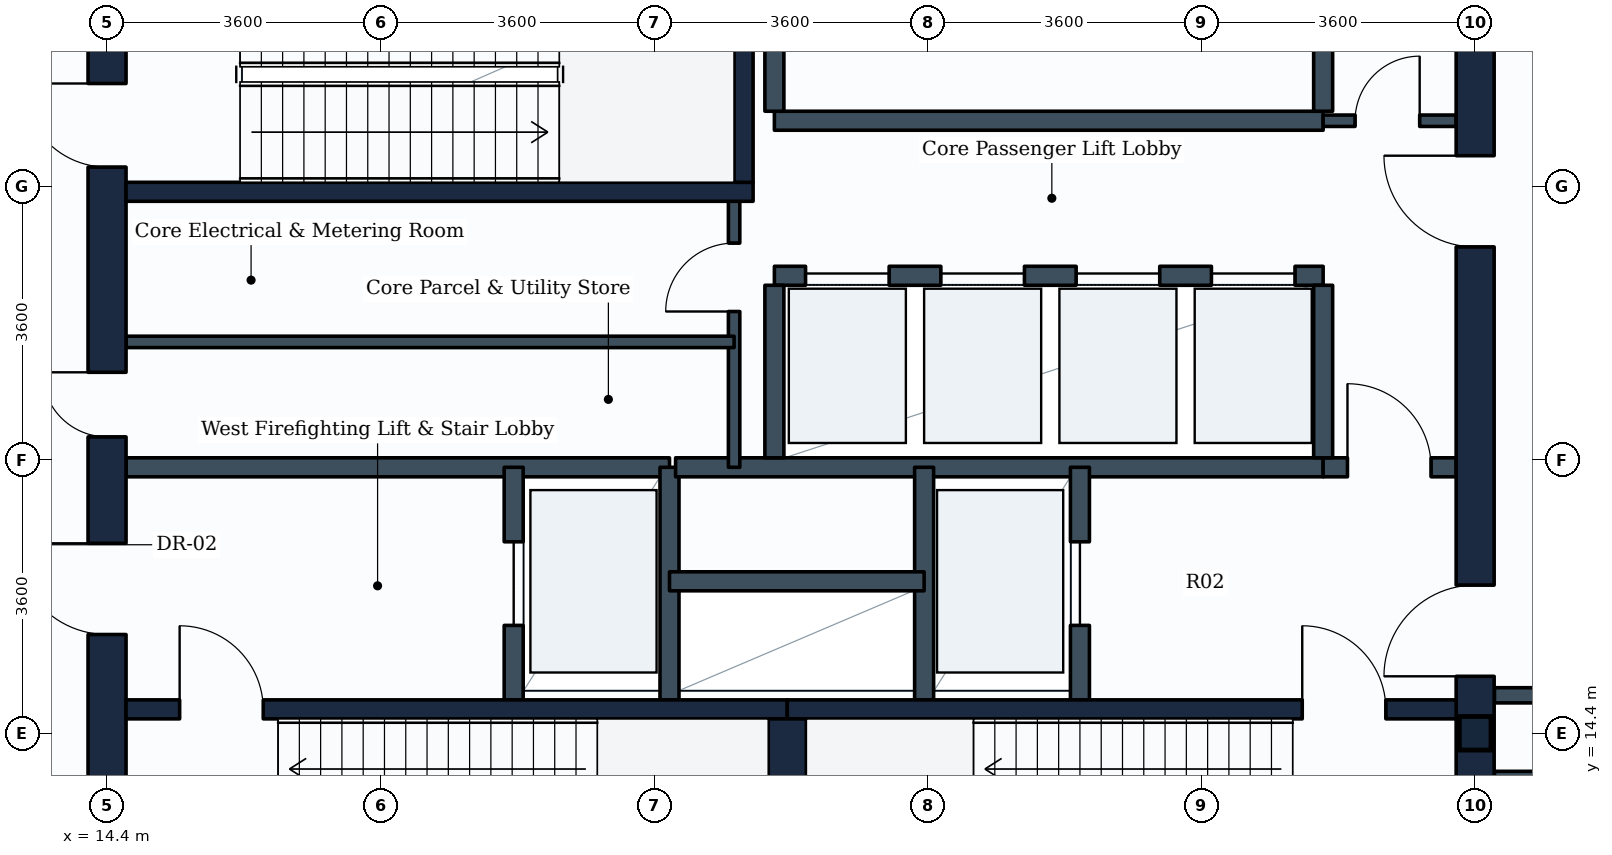
"""IFC4 building model, lengths in metres.
Left out: names, types, materials, properties, quantities, classifications, styles, units other than length and angle.
Written with IfcOpenShell. Run it as: python <this file> out.ifc"""

import sys

from ifc_helpers import new_model, si_unit, direction, frame, frame_2d, origin, origin_2d, place, context, subcontext, project, spatial, rectangle, i_section, extrude, element, fill, save


model = new_model("IFC4")
c1 = context("Model", 3, precision=1e-05, world=origin(), true_north=direction((0.0, 1.0)))
c2 = subcontext(c1, "Body", "Model", "MODEL_VIEW")
j1 = project(units=[si_unit("LENGTHUNIT", "METRE"), si_unit("PLANEANGLEUNIT", "RADIAN")], contexts=[c1])
p1 = place(None, origin())
s1 = spatial("IfcSite", under=j1, at=p1, CompositionType="ELEMENT")
p2 = place(p1, origin())
s2 = spatial("IfcBuilding", under=s1, at=p2, CompositionType="ELEMENT")
p3 = place(p2, frame((0.0, 0.0, 169.4)))
s3 = spatial("IfcBuildingStorey", under=s2, at=p3, CompositionType="ELEMENT", Elevation=169.4)
p4 = place(p3, frame((32.4, 14.4, 0.0), z_axis=(0.0, 0.0, 1.0), x_axis=(1.0, 0.0, 0.0)))
e1 = element("IfcColumn", 1, at=p4, inside=s3, PredefinedType="COLUMN", context=c2, shape_type="SweptSolid", body=[
    extrude(i_section(OverallWidth=0.416, OverallDepth=0.442, WebThickness=0.025, FlangeThickness=0.041, FilletRadius=0.015, at=origin_2d()), origin(), (0.0, 0.0, 1.0), 5.4),
])
p5 = place(p3, frame((14.4, 10.8, 0.0), z_axis=(0.0, 0.0, 1.0), x_axis=(0.0, 1.0, 0.0)))
e2 = element("IfcWall", 2, at=p5, inside=s3, PredefinedType="SHEAR", context=c2, shape_type="SweptSolid", body=[
    extrude(rectangle(XDim=14.4, YDim=0.5, at=frame_2d((7.2, 0.0))), origin(), (0.0, 0.0, 1.0), 5.08),
])
p6 = place(p5, frame((11.05, 0.0, 0.0)))
e3 = element("IfcOpeningElement", 3, at=p6, cuts=e2, PredefinedType="OPENING", context=c2, shape_type="SweptSolid", body=[
    extrude(rectangle(XDim=1.1, YDim=2.1, at=frame_2d((0.55, 1.05))), frame((0.0, 0.26, 0.0), z_axis=(0.0, -1.0, 0.0), x_axis=(1.0, 0.0, 0.0)), (0.0, 0.0, 1.0), 0.52),
])
p7 = place(p5, frame((4.9, 0.0, 0.0)))
e4 = element("IfcOpeningElement", 4, at=p7, cuts=e2, PredefinedType="OPENING", context=c2, shape_type="SweptSolid", body=[
    extrude(rectangle(XDim=1.2, YDim=2.1, at=frame_2d((0.6, 1.05))), frame((0.0, 0.26, 0.0), z_axis=(0.0, -1.0, 0.0), x_axis=(1.0, 0.0, 0.0)), (0.0, 0.0, 1.0), 0.52),
])
p8 = place(p5, frame((7.5, 0.0, 0.0)))
e5 = element("IfcOpeningElement", 5, at=p8, cuts=e2, PredefinedType="OPENING", context=c2, shape_type="SweptSolid", body=[
    extrude(rectangle(XDim=0.85, YDim=2.1, at=frame_2d((0.425, 1.05))), frame((0.0, 0.26, 0.0), z_axis=(0.0, -1.0, 0.0), x_axis=(1.0, 0.0, 0.0)), (0.0, 0.0, 1.0), 0.52),
])
p9 = place(p3, frame((32.4, 10.8, 0.0), z_axis=(0.0, 0.0, 1.0), x_axis=(0.0, 1.0, 0.0)))
e6 = element("IfcWall", 6, at=p9, inside=s3, PredefinedType="SHEAR", context=c2, shape_type="SweptSolid", body=[
    extrude(rectangle(XDim=14.4, YDim=0.5, at=frame_2d((7.2, 0.0))), origin(), (0.0, 0.0, 1.0), 5.08),
])
p10 = place(p9, frame((4.35, 0.0, 0.0)))
e7 = element("IfcOpeningElement", 7, at=p10, cuts=e6, PredefinedType="OPENING", context=c2, shape_type="SweptSolid", body=[
    extrude(rectangle(XDim=1.2, YDim=2.1, at=frame_2d((0.6, 1.05))), frame((0.0, 0.26, 0.0), z_axis=(0.0, -1.0, 0.0), x_axis=(1.0, 0.0, 0.0)), (0.0, 0.0, 1.0), 0.52),
])
p11 = place(p9, frame((10.0, 0.0, 0.0)))
e8 = element("IfcOpeningElement", 8, at=p11, cuts=e6, PredefinedType="OPENING", context=c2, shape_type="SweptSolid", body=[
    extrude(rectangle(XDim=1.2, YDim=2.1, at=frame_2d((0.6, 1.05))), frame((0.0, 0.26, 0.0), z_axis=(0.0, -1.0, 0.0), x_axis=(1.0, 0.0, 0.0)), (0.0, 0.0, 1.0), 0.52),
])
p12 = place(p3, frame((14.65, 14.715, 0.0), z_axis=(0.0, 0.0, 1.0), x_axis=(1.0, 0.0, 0.0)))
e9 = element("IfcWall", 9, at=p12, inside=s3, PredefinedType="SHEAR", context=c2, shape_type="SweptSolid", body=[
    extrude(rectangle(XDim=8.7, YDim=0.25, at=frame_2d((4.35, 0.0))), origin(), (0.0, 0.0, 1.0), 5.08),
])
p13 = place(p12, frame((0.705, 0.0, 0.0)))
e10 = element("IfcOpeningElement", 10, at=p13, cuts=e9, PredefinedType="OPENING", context=c2, shape_type="SweptSolid", body=[
    extrude(rectangle(XDim=1.1, YDim=2.1, at=frame_2d((0.55, 1.05))), frame((0.0, 0.135, 0.0), z_axis=(0.0, -1.0, 0.0), x_axis=(1.0, 0.0, 0.0)), (0.0, 0.0, 1.0), 0.27),
])
p14 = place(p3, frame((23.35, 14.715, 0.0), z_axis=(0.0, 0.0, 1.0), x_axis=(1.0, 0.0, 0.0)))
e11 = element("IfcWall", 11, at=p14, inside=s3, PredefinedType="SHEAR", context=c2, shape_type="SweptSolid", body=[
    extrude(rectangle(XDim=8.8, YDim=0.25, at=frame_2d((4.4, 0.0))), origin(), (0.0, 0.0, 1.0), 5.08),
])
p15 = place(p14, frame((6.775, 0.0, 0.0)))
e12 = element("IfcOpeningElement", 12, at=p15, cuts=e11, PredefinedType="OPENING", context=c2, shape_type="SweptSolid", body=[
    extrude(rectangle(XDim=1.1, YDim=2.1, at=frame_2d((0.55, 1.05))), frame((0.0, 0.135, 0.0), z_axis=(0.0, -1.0, 0.0), x_axis=(1.0, 0.0, 0.0)), (0.0, 0.0, 1.0), 0.27),
])
p16 = place(p3, frame((23.35, 11.75, 0.0), z_axis=(0.0, 0.0, 1.0), x_axis=(0.0, 1.0, 0.0)))
e13 = element("IfcWall", 13, at=p16, inside=s3, PredefinedType="SHEAR", context=c2, shape_type="SweptSolid", body=[
    extrude(rectangle(XDim=2.84, YDim=0.5, at=frame_2d((1.42, 0.0))), origin(), (0.0, 0.0, 1.0), 5.08),
])
p17 = place(p3, frame((14.65, 21.525, 0.0), z_axis=(0.0, 0.0, 1.0), x_axis=(1.0, 0.0, 0.0)))
e14 = element("IfcWall", 14, at=p17, inside=s3, PredefinedType="SHEAR", context=c2, shape_type="SweptSolid", body=[
    extrude(rectangle(XDim=8.25, YDim=0.25, at=frame_2d((4.125, 0.0))), origin(), (0.0, 0.0, 1.0), 5.08),
])
p18 = place(p3, frame((22.775, 21.65, 0.0), z_axis=(0.0, 0.0, 1.0), x_axis=(0.0, 1.0, 0.0)))
e15 = element("IfcWall", 15, at=p18, inside=s3, PredefinedType="SHEAR", context=c2, shape_type="SweptSolid", body=[
    extrude(rectangle(XDim=2.84, YDim=0.25, at=frame_2d((1.42, 0.0))), origin(), (0.0, 0.0, 1.0), 5.08),
])
p19 = place(p3, frame((14.65, 17.9, 0.0), z_axis=(0.0, 0.0, 1.0), x_axis=(1.0, 0.0, 0.0)))
e16 = element("IfcWall", 16, at=p19, inside=s3, PredefinedType="PARTITIONING", context=c2, shape_type="SweptSolid", body=[
    extrude(rectangle(XDim=7.15, YDim=0.25, at=frame_2d((3.575, 0.0))), origin(), (0.0, 0.0, 1.0), 5.065),
])
p20 = place(p3, frame((19.75, 14.84, 0.0), z_axis=(0.0, 0.0, 1.0), x_axis=(0.0, 1.0, 0.0)))
e17 = element("IfcWall", 17, at=p20, inside=s3, PredefinedType="PARTITIONING", context=c2, shape_type="SweptSolid", body=[
    extrude(rectangle(XDim=3.06, YDim=0.25, at=frame_2d((1.53, 0.0))), origin(), (0.0, 0.0, 1.0), 5.065),
])
p21 = place(p20, frame((0.98, 0.0, 0.0)))
e18 = element("IfcOpeningElement", 18, at=p21, cuts=e17, PredefinedType="OPENING", context=c2, shape_type="SweptSolid", body=[
    extrude(rectangle(XDim=1.1, YDim=2.1, at=frame_2d((0.55, 1.05))), frame((0.0, 0.135, 0.0), z_axis=(0.0, -1.0, 0.0), x_axis=(1.0, 0.0, 0.0)), (0.0, 0.0, 1.0), 0.27),
])
p22 = place(p3, frame((21.8, 14.84, 0.0), z_axis=(0.0, 0.0, 1.0), x_axis=(0.0, 1.0, 0.0)))
e19 = element("IfcWall", 19, at=p22, inside=s3, PredefinedType="PARTITIONING", context=c2, shape_type="SweptSolid", body=[
    extrude(rectangle(XDim=3.06, YDim=0.25, at=frame_2d((1.53, 0.0))), origin(), (0.0, 0.0, 1.0), 5.065),
])
p23 = place(p3, frame((21.88, 17.9, 0.0), z_axis=(0.0, 0.0, 1.0), x_axis=(1.0, 0.0, 0.0)))
e20 = element("IfcWall", 20, at=p23, inside=s3, PredefinedType="PARTITIONING", context=c2, shape_type="SweptSolid", body=[
    extrude(rectangle(XDim=8.52, YDim=0.25, at=frame_2d((4.26, 0.0))), origin(), (0.0, 0.0, 1.0), 5.065),
])
p24 = place(p3, frame((30.4, 17.9, 0.0), z_axis=(0.0, 0.0, 1.0), x_axis=(1.0, 0.0, 0.0)))
e21 = element("IfcWall", 21, at=p24, inside=s3, PredefinedType="PARTITIONING", context=c2, shape_type="SweptSolid", body=[
    extrude(rectangle(XDim=1.75, YDim=0.25, at=frame_2d((0.875, 0.0))), origin(), (0.0, 0.0, 1.0), 5.065),
])
p25 = place(p24, frame((0.32, 0.0, 0.0)))
e22 = element("IfcOpeningElement", 22, at=p25, cuts=e21, PredefinedType="OPENING", context=c2, shape_type="SweptSolid", body=[
    extrude(rectangle(XDim=1.1, YDim=2.1, at=frame_2d((0.55, 1.05))), frame((0.0, 0.135, 0.0), z_axis=(0.0, -1.0, 0.0), x_axis=(1.0, 0.0, 0.0)), (0.0, 0.0, 1.0), 0.27),
])
p26 = place(p3, frame((25.15, 14.84, 0.0), z_axis=(0.0, 0.0, 1.0), x_axis=(0.0, 1.0, 0.0)))
e23 = element("IfcWall", 23, at=p26, inside=s3, PredefinedType="PARTITIONING", context=c2, shape_type="SweptSolid", body=[
    extrude(rectangle(XDim=3.06, YDim=0.25, at=frame_2d((1.53, 0.0))), origin(), (0.0, 0.0, 1.0), 5.065),
])
p27 = place(p3, frame((27.2, 14.84, 0.0), z_axis=(0.0, 0.0, 1.0), x_axis=(0.0, 1.0, 0.0)))
e24 = element("IfcWall", 24, at=p27, inside=s3, PredefinedType="PARTITIONING", context=c2, shape_type="SweptSolid", body=[
    extrude(rectangle(XDim=3.06, YDim=0.25, at=frame_2d((1.53, 0.0))), origin(), (0.0, 0.0, 1.0), 5.065),
])
p28 = place(p27, frame((0.98, 0.0, 0.0)))
e25 = element("IfcOpeningElement", 25, at=p28, cuts=e24, PredefinedType="OPENING", context=c2, shape_type="SweptSolid", body=[
    extrude(rectangle(XDim=1.1, YDim=2.1, at=frame_2d((0.55, 1.05))), frame((0.0, 0.135, 0.0), z_axis=(0.0, -1.0, 0.0), x_axis=(1.0, 0.0, 0.0)), (0.0, 0.0, 1.0), 0.27),
])
p29 = place(p3, frame((21.8, 16.4, 0.0), z_axis=(0.0, 0.0, 1.0), x_axis=(1.0, 0.0, 0.0)))
e26 = element("IfcWall", 26, at=p29, inside=s3, PredefinedType="PARTITIONING", context=c2, shape_type="SweptSolid", body=[
    extrude(rectangle(XDim=3.35, YDim=0.25, at=frame_2d((1.675, 0.0))), origin(), (0.0, 0.0, 1.0), 5.065),
])
p30 = place(p3, frame((23.18, 20.42, 0.0), z_axis=(0.0, 0.0, 1.0), x_axis=(1.0, 0.0, 0.0)))
e27 = element("IfcWall", 27, at=p30, inside=s3, PredefinedType="PARTITIONING", context=c2, shape_type="SweptSolid", body=[
    extrude(rectangle(XDim=7.22, YDim=0.25, at=frame_2d((3.61, 0.0))), origin(), (0.0, 0.0, 1.0), 5.065),
])
p31 = place(p30, frame((0.41, 0.0, 0.0)))
e28 = element("IfcOpeningElement", 28, at=p31, cuts=e27, PredefinedType="OPENING", context=c2, shape_type="SweptSolid", body=[
    extrude(rectangle(XDim=1.1, YDim=2.1, at=frame_2d((0.55, 1.05))), frame((0.0, 0.135, 0.0), z_axis=(0.0, -1.0, 0.0), x_axis=(1.0, 0.0, 0.0)), (0.0, 0.0, 1.0), 0.27),
])
p32 = place(p30, frame((2.19, 0.0, 0.0)))
e29 = element("IfcOpeningElement", 29, at=p32, cuts=e27, PredefinedType="OPENING", context=c2, shape_type="SweptSolid", body=[
    extrude(rectangle(XDim=1.1, YDim=2.1, at=frame_2d((0.55, 1.05))), frame((0.0, 0.135, 0.0), z_axis=(0.0, -1.0, 0.0), x_axis=(1.0, 0.0, 0.0)), (0.0, 0.0, 1.0), 0.27),
])
p33 = place(p30, frame((3.97, 0.0, 0.0)))
e30 = element("IfcOpeningElement", 30, at=p33, cuts=e27, PredefinedType="OPENING", context=c2, shape_type="SweptSolid", body=[
    extrude(rectangle(XDim=1.1, YDim=2.1, at=frame_2d((0.55, 1.05))), frame((0.0, 0.135, 0.0), z_axis=(0.0, -1.0, 0.0), x_axis=(1.0, 0.0, 0.0)), (0.0, 0.0, 1.0), 0.27),
])
p34 = place(p30, frame((5.75, 0.0, 0.0)))
e31 = element("IfcOpeningElement", 31, at=p34, cuts=e27, PredefinedType="OPENING", context=c2, shape_type="SweptSolid", body=[
    extrude(rectangle(XDim=1.1, YDim=2.1, at=frame_2d((0.55, 1.05))), frame((0.0, 0.135, 0.0), z_axis=(0.0, -1.0, 0.0), x_axis=(1.0, 0.0, 0.0)), (0.0, 0.0, 1.0), 0.27),
])
for number, where, z_axis, x_axis in (
    (32, (23.18, 18.025, 0.0), (0.0, 0.0, 1.0), (0.0, 1.0, 0.0)),
    (33, (30.4, 18.025, 0.0), (0.0, 0.0, 1.0), (0.0, 1.0, 0.0)),
):
    element("IfcWall", number, at=place(p3, frame(where, z_axis=z_axis, x_axis=x_axis)), inside=s3, PredefinedType="PARTITIONING", context=c2, shape_type="SweptSolid", body=[
        extrude(rectangle(XDim=2.27, YDim=0.25, at=frame_2d((1.135, 0.0))), origin(), (0.0, 0.0, 1.0), 5.065),
    ])
p35 = place(p3, frame((23.18, 22.46, 0.0), z_axis=(0.0, 0.0, 1.0), x_axis=(1.0, 0.0, 0.0)))
e34 = element("IfcWall", 34, at=p35, inside=s3, PredefinedType="PARTITIONING", context=c2, shape_type="SweptSolid", body=[
    extrude(rectangle(XDim=7.22, YDim=0.25, at=frame_2d((3.61, 0.0))), origin(), (0.0, 0.0, 1.0), 5.065),
])
for number, where, z_axis, x_axis in (
    (35, (23.18, 22.585, 0.0), (0.0, 0.0, 1.0), (0.0, 1.0, 0.0)),
    (36, (30.4, 22.585, 0.0), (0.0, 0.0, 1.0), (0.0, 1.0, 0.0)),
):
    element("IfcWall", number, at=place(p3, frame(where, z_axis=z_axis, x_axis=x_axis)), inside=s3, PredefinedType="PARTITIONING", context=c2, shape_type="SweptSolid", body=[
        extrude(rectangle(XDim=2.315, YDim=0.25, at=frame_2d((1.157, 0.0))), origin(), (0.0, 0.0, 1.0), 5.065),
    ])
p36 = place(p3, frame((22.65, 17.9, 0.0), z_axis=(0.0, 0.0, 1.0), x_axis=(0.0, 1.0, 0.0)))
e37 = element("IfcWall", 37, at=p36, inside=s3, PredefinedType="PARTITIONING", context=c2, shape_type="SweptSolid", body=[
    extrude(rectangle(XDim=3.625, YDim=0.15, at=frame_2d((1.812, 0.0))), origin(), (0.0, 0.0, 1.0), 5.065),
])
p37 = place(p36, frame((2.05, 0.0, 0.0)))
e38 = element("IfcOpeningElement", 38, at=p37, cuts=e37, PredefinedType="OPENING", context=c2, shape_type="SweptSolid", body=[
    extrude(rectangle(XDim=0.9, YDim=2.1, at=frame_2d((0.45, 1.05))), frame((0.0, 0.085, 0.0), z_axis=(0.0, -1.0, 0.0), x_axis=(1.0, 0.0, 0.0)), (0.0, 0.0, 1.0), 0.17),
])
p38 = place(p3, frame((14.65, 19.55, 0.0), z_axis=(0.0, 0.0, 1.0), x_axis=(1.0, 0.0, 0.0)))
e39 = element("IfcWall", 39, at=p38, inside=s3, PredefinedType="PARTITIONING", context=c2, shape_type="SweptSolid", body=[
    extrude(rectangle(XDim=8.0, YDim=0.15, at=frame_2d((4.0, 0.0))), origin(), (0.0, 0.0, 1.0), 5.065),
])
p39 = place(p3, frame((30.4, 22.46, 0.0), z_axis=(0.0, 0.0, 1.0), x_axis=(1.0, 0.0, 0.0)))
e40 = element("IfcWall", 40, at=p39, inside=s3, PredefinedType="PARTITIONING", context=c2, shape_type="SweptSolid", body=[
    extrude(rectangle(XDim=1.75, YDim=0.15, at=frame_2d((0.875, 0.0))), origin(), (0.0, 0.0, 1.0), 5.065),
])
p40 = place(p39, frame((0.42, 0.0, 0.0)))
e41 = element("IfcOpeningElement", 41, at=p40, cuts=e40, PredefinedType="OPENING", context=c2, shape_type="SweptSolid", body=[
    extrude(rectangle(XDim=0.85, YDim=2.1, at=frame_2d((0.425, 1.05))), frame((0.0, 0.085, 0.0), z_axis=(0.0, -1.0, 0.0), x_axis=(1.0, 0.0, 0.0)), (0.0, 0.0, 1.0), 0.17),
])
for number, where, z_axis, x_axis in (
    (42, (32.654, 13.8, 0.0), (0.0, 0.0, 1.0), (1.0, 0.0, 0.0)),
    (43, (32.654, 14.9, 0.0), (0.0, 0.0, 1.0), (1.0, 0.0, 0.0)),
):
    element("IfcWall", number, at=place(p3, frame(where, z_axis=z_axis, x_axis=x_axis)), inside=s3, PredefinedType="PARTITIONING", context=c2, shape_type="SweptSolid", body=[
        extrude(rectangle(XDim=11.096, YDim=0.2, at=frame_2d((5.548, 0.0))), origin(), (0.0, 0.0, 1.0), 3.58),
    ])
p41 = place(p13, origin())
e44 = element("IfcDoor", 44, at=p41, inside=s3, OperationType="SINGLE_SWING_LEFT", PredefinedType="DOOR", context=c2, shape_type="SweptSolid", body=[
    extrude(rectangle(XDim=1.1, YDim=2.1, at=frame_2d((0.55, 1.05))), frame((0.0, 0.025, 0.0), z_axis=(0.0, -1.0, 0.0), x_axis=(1.0, 0.0, 0.0)), (0.0, 0.0, 1.0), 0.05),
])
fill(e10, e44)
p42 = place(p15, origin())
e45 = element("IfcDoor", 45, at=p42, inside=s3, OperationType="SINGLE_SWING_LEFT", PredefinedType="DOOR", context=c2, shape_type="SweptSolid", body=[
    extrude(rectangle(XDim=1.1, YDim=2.1, at=frame_2d((0.55, 1.05))), frame((0.0, 0.025, 0.0), z_axis=(0.0, -1.0, 0.0), x_axis=(1.0, 0.0, 0.0)), (0.0, 0.0, 1.0), 0.05),
])
fill(e12, e45)
p43 = place(p6, origin())
e46 = element("IfcDoor", 46, at=p43, inside=s3, OperationType="SINGLE_SWING_RIGHT", PredefinedType="DOOR", context=c2, shape_type="SweptSolid", body=[
    extrude(rectangle(XDim=1.1, YDim=2.1, at=frame_2d((0.55, 1.05))), frame((0.0, 0.025, 0.0), z_axis=(0.0, -1.0, 0.0), x_axis=(1.0, 0.0, 0.0)), (0.0, 0.0, 1.0), 0.05),
])
fill(e3, e46)
p44 = place(p21, origin())
e47 = element("IfcDoor", 47, at=p44, inside=s3, OperationType="SLIDING_TO_LEFT", PredefinedType="DOOR", context=c2, shape_type="SweptSolid", body=[
    extrude(rectangle(XDim=1.1, YDim=2.1, at=frame_2d((0.55, 1.05))), frame((0.0, 0.025, 0.0), z_axis=(0.0, -1.0, 0.0), x_axis=(1.0, 0.0, 0.0)), (0.0, 0.0, 1.0), 0.05),
])
fill(e18, e47)
p45 = place(p28, origin())
e48 = element("IfcDoor", 48, at=p45, inside=s3, OperationType="SLIDING_TO_LEFT", PredefinedType="DOOR", context=c2, shape_type="SweptSolid", body=[
    extrude(rectangle(XDim=1.1, YDim=2.1, at=frame_2d((0.55, 1.05))), frame((0.0, 0.025, 0.0), z_axis=(0.0, -1.0, 0.0), x_axis=(1.0, 0.0, 0.0)), (0.0, 0.0, 1.0), 0.05),
])
fill(e25, e48)
p46 = place(p7, origin())
e49 = element("IfcDoor", 49, at=p46, inside=s3, OperationType="SINGLE_SWING_RIGHT", PredefinedType="DOOR", context=c2, shape_type="SweptSolid", body=[
    extrude(rectangle(XDim=1.2, YDim=2.1, at=frame_2d((0.6, 1.05))), frame((0.0, 0.025, 0.0), z_axis=(0.0, -1.0, 0.0), x_axis=(1.0, 0.0, 0.0)), (0.0, 0.0, 1.0), 0.05),
])
fill(e4, e49)
p47 = place(p10, origin())
e50 = element("IfcDoor", 50, at=p47, inside=s3, OperationType="SINGLE_SWING_LEFT", PredefinedType="DOOR", context=c2, shape_type="SweptSolid", body=[
    extrude(rectangle(XDim=1.2, YDim=2.1, at=frame_2d((0.6, 1.05))), frame((0.0, 0.025, 0.0), z_axis=(0.0, -1.0, 0.0), x_axis=(1.0, 0.0, 0.0)), (0.0, 0.0, 1.0), 0.05),
])
fill(e7, e50)
p48 = place(p25, origin())
e51 = element("IfcDoor", 51, at=p48, inside=s3, OperationType="SINGLE_SWING_LEFT", PredefinedType="DOOR", context=c2, shape_type="SweptSolid", body=[
    extrude(rectangle(XDim=1.1, YDim=2.1, at=frame_2d((0.55, 1.05))), frame((0.0, 0.025, 0.0), z_axis=(0.0, -1.0, 0.0), x_axis=(1.0, 0.0, 0.0)), (0.0, 0.0, 1.0), 0.05),
])
fill(e22, e51)
p49 = place(p31, origin())
e52 = element("IfcDoor", 52, at=p49, inside=s3, OperationType="SLIDING_TO_LEFT", PredefinedType="DOOR", context=c2, shape_type="SweptSolid", body=[
    extrude(rectangle(XDim=1.1, YDim=2.1, at=frame_2d((0.55, 1.05))), frame((0.0, 0.025, 0.0), z_axis=(0.0, -1.0, 0.0), x_axis=(1.0, 0.0, 0.0)), (0.0, 0.0, 1.0), 0.05),
])
fill(e28, e52)
p50 = place(p32, origin())
e53 = element("IfcDoor", 53, at=p50, inside=s3, OperationType="SLIDING_TO_LEFT", PredefinedType="DOOR", context=c2, shape_type="SweptSolid", body=[
    extrude(rectangle(XDim=1.1, YDim=2.1, at=frame_2d((0.55, 1.05))), frame((0.0, 0.025, 0.0), z_axis=(0.0, -1.0, 0.0), x_axis=(1.0, 0.0, 0.0)), (0.0, 0.0, 1.0), 0.05),
])
fill(e29, e53)
p51 = place(p33, origin())
e54 = element("IfcDoor", 54, at=p51, inside=s3, OperationType="SLIDING_TO_LEFT", PredefinedType="DOOR", context=c2, shape_type="SweptSolid", body=[
    extrude(rectangle(XDim=1.1, YDim=2.1, at=frame_2d((0.55, 1.05))), frame((0.0, 0.025, 0.0), z_axis=(0.0, -1.0, 0.0), x_axis=(1.0, 0.0, 0.0)), (0.0, 0.0, 1.0), 0.05),
])
fill(e30, e54)
p52 = place(p34, origin())
e55 = element("IfcDoor", 55, at=p52, inside=s3, OperationType="SLIDING_TO_LEFT", PredefinedType="DOOR", context=c2, shape_type="SweptSolid", body=[
    extrude(rectangle(XDim=1.1, YDim=2.1, at=frame_2d((0.55, 1.05))), frame((0.0, 0.025, 0.0), z_axis=(0.0, -1.0, 0.0), x_axis=(1.0, 0.0, 0.0)), (0.0, 0.0, 1.0), 0.05),
])
fill(e31, e55)
p53 = place(p11, origin())
e56 = element("IfcDoor", 56, at=p53, inside=s3, OperationType="SINGLE_SWING_RIGHT", PredefinedType="DOOR", context=c2, shape_type="SweptSolid", body=[
    extrude(rectangle(XDim=1.2, YDim=2.1, at=frame_2d((0.6, 1.05))), frame((0.0, 0.025, 0.0), z_axis=(0.0, -1.0, 0.0), x_axis=(1.0, 0.0, 0.0)), (0.0, 0.0, 1.0), 0.05),
])
fill(e8, e56)
p54 = place(p8, origin())
e57 = element("IfcDoor", 57, at=p54, inside=s3, OperationType="SINGLE_SWING_RIGHT", PredefinedType="DOOR", context=c2, shape_type="SweptSolid", body=[
    extrude(rectangle(XDim=0.85, YDim=2.1, at=frame_2d((0.425, 1.05))), frame((0.0, 0.025, 0.0), z_axis=(0.0, -1.0, 0.0), x_axis=(1.0, 0.0, 0.0)), (0.0, 0.0, 1.0), 0.05),
])
fill(e5, e57)
p55 = place(p37, origin())
e58 = element("IfcDoor", 58, at=p55, inside=s3, OperationType="SINGLE_SWING_LEFT", PredefinedType="DOOR", context=c2, shape_type="SweptSolid", body=[
    extrude(rectangle(XDim=0.9, YDim=2.1, at=frame_2d((0.45, 1.05))), frame((0.0, 0.025, 0.0), z_axis=(0.0, -1.0, 0.0), x_axis=(1.0, 0.0, 0.0)), (0.0, 0.0, 1.0), 0.05),
])
fill(e38, e58)
p56 = place(p40, origin())
e59 = element("IfcDoor", 59, at=p56, inside=s3, OperationType="SINGLE_SWING_RIGHT", PredefinedType="DOOR", context=c2, shape_type="SweptSolid", body=[
    extrude(rectangle(XDim=0.85, YDim=2.1, at=frame_2d((0.425, 1.05))), frame((0.0, 0.025, 0.0), z_axis=(0.0, -1.0, 0.0), x_axis=(1.0, 0.0, 0.0)), (0.0, 0.0, 1.0), 0.05),
])
fill(e41, e59)
save(model, sys.argv[1])
